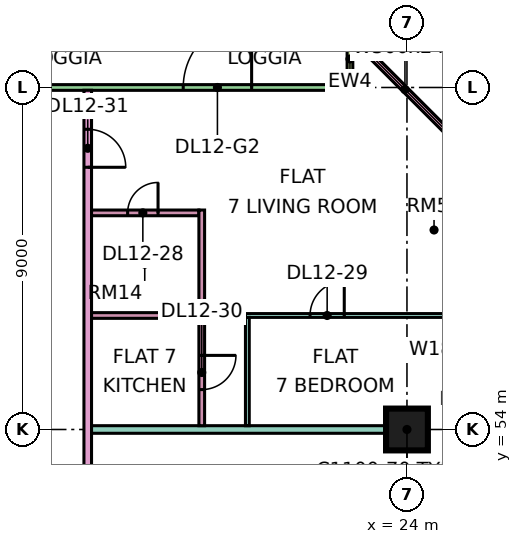
"""IFC4 building model, lengths in metres.
Left out: names, types, materials, properties, quantities, classifications, styles, units other than length and angle.
Written with IfcOpenShell. Run it as: python <this file> out.ifc"""

import sys

from ifc_helpers import new_model, si_unit, direction, frame, frame_2d, origin, origin_2d, place, context, subcontext, project, spatial, rectangle, extrude, element, fill, save


model = new_model("IFC4")
c1 = context("Model", 3, precision=1e-05, world=origin(), true_north=direction((0.0, 1.0)))
c2 = subcontext(c1, "Body", "Model", "MODEL_VIEW")
j1 = project(units=[si_unit("LENGTHUNIT", "METRE"), si_unit("PLANEANGLEUNIT", "RADIAN")], contexts=[c1])
p1 = place(None, origin())
s1 = spatial("IfcSite", under=j1, at=p1, CompositionType="ELEMENT")
p2 = place(p1, origin())
s2 = spatial("IfcBuilding", under=s1, at=p2, CompositionType="ELEMENT")
p3 = place(p2, frame((0.0, 0.0, 60.15)))
s3 = spatial("IfcBuildingStorey", under=s2, at=p3, CompositionType="ELEMENT", Elevation=60.15)
p4 = place(p3, frame((24.0, 54.0, 0.0), z_axis=(0.0, 0.0, 1.0), x_axis=(1.0, 0.0, 0.0)))
e1 = element("IfcColumn", 1, at=p4, inside=s3, PredefinedType="COLUMN", context=c2, shape_type="SweptSolid", body=[
    extrude(rectangle(XDim=1.1, YDim=1.1, at=origin_2d()), origin(), (0.0, 0.0, 1.0), 3.75),
])
p5 = place(p3, frame((25.447, 61.447, 0.0), z_axis=(0.0, 0.0, 1.0), x_axis=(-0.707106781187, 0.707106781187, 0.0)))
e2 = element("IfcWall", 2, at=p5, inside=s3, PredefinedType="SOLIDWALL", context=c2, shape_type="SweptSolid", body=[
    extrude(rectangle(XDim=4.243, YDim=0.15, at=frame_2d((2.121, 0.0))), origin(), (0.0, 0.0, 1.0), 3.35),
])
p6 = place(p5, frame((0.621, 0.0, 0.45)))
e3 = element("IfcOpeningElement", 3, at=p6, cuts=e2, PredefinedType="OPENING", context=c2, shape_type="SweptSolid", body=[
    extrude(rectangle(XDim=3.0, YDim=2.4, at=frame_2d((1.5, 1.2))), frame((0.0, 0.085, 0.0), z_axis=(0.0, -1.0, 0.0), x_axis=(1.0, 0.0, 0.0)), (0.0, 0.0, 1.0), 0.17),
])
p7 = place(p3, frame((22.425, 63.0, 0.0), z_axis=(0.0, 0.0, 1.0), x_axis=(-1.0, 0.0, 0.0)))
e4 = element("IfcWall", 4, at=p7, inside=s3, PredefinedType="SOLIDWALL", context=c2, shape_type="SweptSolid", body=[
    extrude(rectangle(XDim=10.35, YDim=0.15, at=frame_2d((5.175, 0.0))), origin(), (0.0, 0.0, 1.0), 3.35),
])
p8 = place(p7, frame((2.512, 0.0, 0.0)))
e5 = element("IfcOpeningElement", 5, at=p8, cuts=e4, PredefinedType="OPENING", context=c2, shape_type="SweptSolid", body=[
    extrude(rectangle(XDim=1.8, YDim=2.4, at=frame_2d((0.9, 1.2))), frame((0.0, 0.085, 0.0), z_axis=(0.0, -1.0, 0.0), x_axis=(1.0, 0.0, 0.0)), (0.0, 0.0, 1.0), 0.17),
])
p9 = place(p3, frame((22.5, 64.5, 0.0), z_axis=(0.0, 0.0, 1.0), x_axis=(0.0, -1.0, 0.0)))
e6 = element("IfcWall", 6, at=p9, inside=s3, PredefinedType="SOLIDWALL", context=c2, shape_type="SweptSolid", body=[
    extrude(rectangle(XDim=1.5, YDim=0.15, at=frame_2d((0.75, 0.0))), origin(), (0.0, 0.0, 1.0), 3.35),
])
p10 = place(p3, frame((15.6, 51.225, 0.0), z_axis=(0.0, 0.0, 1.0), x_axis=(0.0, 1.0, 0.0)))
e7 = element("IfcWall", 7, at=p10, inside=s3, PredefinedType="PARTITIONING", context=c2, shape_type="SweptSolid", body=[
    extrude(rectangle(XDim=11.701, YDim=0.2, at=frame_2d((5.851, 0.0))), origin(), (0.0, 0.0, 1.0), 3.35),
])
p11 = place(p10, frame((9.675, 0.0, 0.0)))
e8 = element("IfcOpeningElement", 8, at=p11, cuts=e7, PredefinedType="OPENING", context=c2, shape_type="SweptSolid", body=[
    extrude(rectangle(XDim=1.0, YDim=2.1, at=frame_2d((0.5, 1.05))), frame((0.0, 0.11, 0.0), z_axis=(0.0, -1.0, 0.0), x_axis=(1.0, 0.0, 0.0)), (0.0, 0.0, 1.0), 0.22),
])
p12 = place(p3, frame((15.7, 54.0, 0.0), z_axis=(0.0, 0.0, 1.0), x_axis=(1.0, 0.0, 0.0)))
e9 = element("IfcWall", 9, at=p12, inside=s3, PredefinedType="PARTITIONING", context=c2, shape_type="SweptSolid", body=[
    extrude(rectangle(XDim=8.3, YDim=0.2, at=frame_2d((4.15, 0.0))), origin(), (0.0, 0.0, 1.0), 3.35),
])
p13 = place(p3, frame((15.7, 57.0, 0.0), z_axis=(0.0, 0.0, 1.0), x_axis=(1.0, 0.0, 0.0)))
e10 = element("IfcWall", 10, at=p13, inside=s3, PredefinedType="PARTITIONING", context=c2, shape_type="SweptSolid", body=[
    extrude(rectangle(XDim=2.825, YDim=0.15, at=frame_2d((1.413, 0.0))), origin(), (0.0, 0.0, 1.0), 3.35),
])
p14 = place(p3, frame((15.7, 59.7, 0.0), z_axis=(0.0, 0.0, 1.0), x_axis=(1.0, 0.0, 0.0)))
e11 = element("IfcWall", 11, at=p14, inside=s3, PredefinedType="PARTITIONING", context=c2, shape_type="SweptSolid", body=[
    extrude(rectangle(XDim=2.825, YDim=0.15, at=frame_2d((1.413, 0.0))), origin(), (0.0, 0.0, 1.0), 3.35),
])
p15 = place(p14, frame((0.95, 0.0, 0.0)))
e12 = element("IfcOpeningElement", 12, at=p15, cuts=e11, PredefinedType="OPENING", context=c2, shape_type="SweptSolid", body=[
    extrude(rectangle(XDim=0.8, YDim=2.1, at=frame_2d((0.4, 1.05))), frame((0.0, 0.085, 0.0), z_axis=(0.0, -1.0, 0.0), x_axis=(1.0, 0.0, 0.0)), (0.0, 0.0, 1.0), 0.17),
])
p16 = place(p3, frame((18.6, 54.1, 0.0), z_axis=(0.0, 0.0, 1.0), x_axis=(0.0, 1.0, 0.0)))
e13 = element("IfcWall", 13, at=p16, inside=s3, PredefinedType="PARTITIONING", context=c2, shape_type="SweptSolid", body=[
    extrude(rectangle(XDim=5.675, YDim=0.15, at=frame_2d((2.837, 0.0))), origin(), (0.0, 0.0, 1.0), 3.35),
])
p17 = place(p16, frame((0.95, 0.0, 0.0)))
e14 = element("IfcOpeningElement", 14, at=p17, cuts=e13, PredefinedType="OPENING", context=c2, shape_type="SweptSolid", body=[
    extrude(rectangle(XDim=0.9, YDim=2.1, at=frame_2d((0.45, 1.05))), frame((0.0, 0.085, 0.0), z_axis=(0.0, -1.0, 0.0), x_axis=(1.0, 0.0, 0.0)), (0.0, 0.0, 1.0), 0.17),
])
p18 = place(p3, frame((19.75, 57.0, 0.0), z_axis=(0.0, 0.0, 1.0), x_axis=(1.0, 0.0, 0.0)))
e15 = element("IfcWall", 15, at=p18, inside=s3, PredefinedType="PARTITIONING", context=c2, shape_type="SweptSolid", body=[
    extrude(rectangle(XDim=5.6, YDim=0.1, at=frame_2d((2.8, 0.0))), origin(), (0.0, 0.0, 1.0), 3.35),
])
p19 = place(p18, frame((1.7, 0.0, 0.0)))
e16 = element("IfcOpeningElement", 16, at=p19, cuts=e15, PredefinedType="OPENING", context=c2, shape_type="SweptSolid", body=[
    extrude(rectangle(XDim=0.9, YDim=2.1, at=frame_2d((0.45, 1.05))), frame((0.0, 0.06, 0.0), z_axis=(0.0, -1.0, 0.0), x_axis=(1.0, 0.0, 0.0)), (0.0, 0.0, 1.0), 0.12),
])
p20 = place(p3, frame((19.8, 54.1, 0.0), z_axis=(0.0, 0.0, 1.0), x_axis=(0.0, 1.0, 0.0)))
e17 = element("IfcWall", 17, at=p20, inside=s3, PredefinedType="PARTITIONING", context=c2, shape_type="SweptSolid", body=[
    extrude(rectangle(XDim=2.85, YDim=0.1, at=frame_2d((1.425, 0.0))), origin(), (0.0, 0.0, 1.0), 3.35),
])
p21 = place(p6, origin())
e18 = element("IfcWindow", 18, at=p21, inside=s3, PartitioningType="SINGLE_PANEL", PredefinedType="WINDOW", context=c2, shape_type="SweptSolid", body=[
    extrude(rectangle(XDim=3.0, YDim=2.4, at=frame_2d((1.5, 1.2))), frame((0.0, 0.03, 0.0), z_axis=(0.0, -1.0, 0.0), x_axis=(1.0, 0.0, 0.0)), (0.0, 0.0, 1.0), 0.06),
])
fill(e3, e18)
p22 = place(p8, frame((1.8, 0.0, 0.0), z_axis=(0.0, 0.0, 1.0), x_axis=(-1.0, 0.0, 0.0)))
e19 = element("IfcDoor", 19, at=p22, inside=s3, OperationType="DOUBLE_DOOR_SINGLE_SWING", PredefinedType="DOOR", context=c2, shape_type="SweptSolid", body=[
    extrude(rectangle(XDim=1.8, YDim=2.4, at=frame_2d((0.9, 1.2))), frame((0.0, 0.025, 0.0), z_axis=(0.0, -1.0, 0.0), x_axis=(1.0, 0.0, 0.0)), (0.0, 0.0, 1.0), 0.05),
])
fill(e5, e19)
p23 = place(p15, frame((0.8, 0.0, 0.0), z_axis=(0.0, 0.0, 1.0), x_axis=(-1.0, 0.0, 0.0)))
e20 = element("IfcDoor", 20, at=p23, inside=s3, OperationType="SINGLE_SWING_RIGHT", PredefinedType="DOOR", context=c2, shape_type="SweptSolid", body=[
    extrude(rectangle(XDim=0.8, YDim=2.1, at=frame_2d((0.4, 1.05))), frame((0.0, 0.025, 0.0), z_axis=(0.0, -1.0, 0.0), x_axis=(1.0, 0.0, 0.0)), (0.0, 0.0, 1.0), 0.05),
])
fill(e12, e20)
p24 = place(p19, frame((0.9, 0.0, 0.0), z_axis=(0.0, 0.0, 1.0), x_axis=(-1.0, 0.0, 0.0)))
e21 = element("IfcDoor", 21, at=p24, inside=s3, OperationType="SINGLE_SWING_RIGHT", PredefinedType="DOOR", context=c2, shape_type="SweptSolid", body=[
    extrude(rectangle(XDim=0.9, YDim=2.1, at=frame_2d((0.45, 1.05))), frame((0.0, 0.025, 0.0), z_axis=(0.0, -1.0, 0.0), x_axis=(1.0, 0.0, 0.0)), (0.0, 0.0, 1.0), 0.05),
])
fill(e16, e21)
p25 = place(p17, origin())
e22 = element("IfcDoor", 22, at=p25, inside=s3, OperationType="SINGLE_SWING_RIGHT", PredefinedType="DOOR", context=c2, shape_type="SweptSolid", body=[
    extrude(rectangle(XDim=0.9, YDim=2.1, at=frame_2d((0.45, 1.05))), frame((0.0, 0.025, 0.0), z_axis=(0.0, -1.0, 0.0), x_axis=(1.0, 0.0, 0.0)), (0.0, 0.0, 1.0), 0.05),
])
fill(e14, e22)
p26 = place(p11, frame((1.0, 0.0, 0.0), z_axis=(0.0, 0.0, 1.0), x_axis=(-1.0, 0.0, 0.0)))
e23 = element("IfcDoor", 23, at=p26, inside=s3, OperationType="SINGLE_SWING_LEFT", PredefinedType="DOOR", context=c2, shape_type="SweptSolid", body=[
    extrude(rectangle(XDim=1.0, YDim=2.1, at=frame_2d((0.5, 1.05))), frame((0.0, 0.025, 0.0), z_axis=(0.0, -1.0, 0.0), x_axis=(1.0, 0.0, 0.0)), (0.0, 0.0, 1.0), 0.05),
])
fill(e8, e23)
save(model, sys.argv[1])
